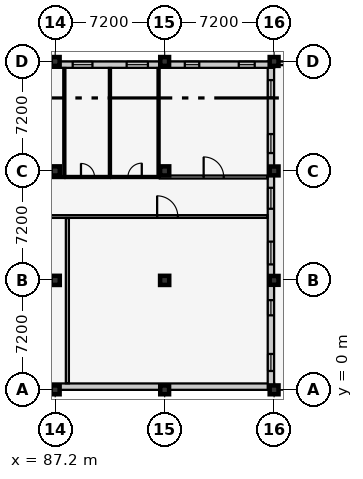
"""IFC4 building model, lengths in metres.
Left out: names, types, materials, properties, quantities, classifications, styles, units other than length and angle.
Written with IfcOpenShell. Run it as: python <this file> out.ifc"""

import sys

from ifc_helpers import new_model, si_unit, direction, frame, frame_2d, origin, origin_2d, place, context, subcontext, project, spatial, rectangle, extrude, element, fill, save


model = new_model("IFC4")
c1 = context("Model", 3, precision=1e-05, world=origin(), true_north=direction((0.0, 1.0)))
c2 = subcontext(c1, "Body", "Model", "MODEL_VIEW")
j1 = project(units=[si_unit("LENGTHUNIT", "METRE"), si_unit("PLANEANGLEUNIT", "RADIAN")], contexts=[c1])
p1 = place(None, origin())
s1 = spatial("IfcSite", under=j1, at=p1, CompositionType="ELEMENT")
p2 = place(p1, origin())
s2 = spatial("IfcBuilding", under=s1, at=p2, CompositionType="ELEMENT")
p3 = place(p2, frame((0.0, 0.0, 9.6)))
s3 = spatial("IfcBuildingStorey", under=s2, at=p3, CompositionType="ELEMENT", Elevation=9.6)
p4 = place(p3, frame((87.2, 0.0, 0.0), z_axis=(0.0, 0.0, 1.0), x_axis=(1.0, 0.0, 0.0)))
e1 = element("IfcColumn", 1, at=p4, inside=s3, PredefinedType="COLUMN", context=c2, shape_type="SweptSolid", body=[
    extrude(rectangle(XDim=0.58, YDim=0.58, at=origin_2d()), origin(), (0.0, 0.0, 1.0), 4.2),
])
for number, where, z_axis, x_axis in (
    (2, (87.2, 7.2, 0.0), (0.0, 0.0, 1.0), (1.0, 0.0, 0.0)),
    (3, (87.2, 14.4, 0.0), (0.0, 0.0, 1.0), (1.0, 0.0, 0.0)),
):
    element("IfcColumn", number, at=place(p3, frame(where, z_axis=z_axis, x_axis=x_axis)), inside=s3, PredefinedType="COLUMN", context=c2, shape_type="SweptSolid", body=[
        extrude(rectangle(XDim=0.6, YDim=0.6, at=origin_2d()), origin(), (0.0, 0.0, 1.0), 4.2),
    ])
for number, where, z_axis, x_axis in (
    (4, (87.2, 21.6, 0.0), (0.0, 0.0, 1.0), (1.0, 0.0, 0.0)),
    (5, (94.4, 0.0, 0.0), (0.0, 0.0, 1.0), (1.0, 0.0, 0.0)),
):
    element("IfcColumn", number, at=place(p3, frame(where, z_axis=z_axis, x_axis=x_axis)), inside=s3, PredefinedType="COLUMN", context=c2, shape_type="SweptSolid", body=[
        extrude(rectangle(XDim=0.58, YDim=0.58, at=origin_2d()), origin(), (0.0, 0.0, 1.0), 4.2),
    ])
for number, where, z_axis, x_axis in (
    (6, (94.4, 7.2, 0.0), (0.0, 0.0, 1.0), (1.0, 0.0, 0.0)),
    (7, (94.4, 14.4, 0.0), (0.0, 0.0, 1.0), (1.0, 0.0, 0.0)),
):
    element("IfcColumn", number, at=place(p3, frame(where, z_axis=z_axis, x_axis=x_axis)), inside=s3, PredefinedType="COLUMN", context=c2, shape_type="SweptSolid", body=[
        extrude(rectangle(XDim=0.6, YDim=0.6, at=origin_2d()), origin(), (0.0, 0.0, 1.0), 4.2),
    ])
for number, where, z_axis, x_axis in (
    (8, (94.4, 21.6, 0.0), (0.0, 0.0, 1.0), (1.0, 0.0, 0.0)),
    (9, (101.6, 0.0, 0.0), (0.0, 0.0, 1.0), (1.0, 0.0, 0.0)),
    (10, (101.6, 7.2, 0.0), (0.0, 0.0, 1.0), (1.0, 0.0, 0.0)),
    (11, (101.6, 14.4, 0.0), (0.0, 0.0, 1.0), (1.0, 0.0, 0.0)),
    (12, (101.6, 21.6, 0.0), (0.0, 0.0, 1.0), (1.0, 0.0, 0.0)),
):
    element("IfcColumn", number, at=place(p3, frame(where, z_axis=z_axis, x_axis=x_axis)), inside=s3, PredefinedType="COLUMN", context=c2, shape_type="SweptSolid", body=[
        extrude(rectangle(XDim=0.58, YDim=0.58, at=origin_2d()), origin(), (0.0, 0.0, 1.0), 4.2),
    ])
p5 = place(p3, frame((101.6, 0.21, 0.0), z_axis=(0.0, 0.0, 1.0), x_axis=(-1.0, 0.0, 0.0)))
e13 = element("IfcWall", 13, at=p5, inside=s3, PredefinedType="SOLIDWALL", context=c2, shape_type="SweptSolid", body=[
    extrude(rectangle(XDim=43.2, YDim=0.42, at=frame_2d((21.6, 0.0))), origin(), (0.0, 0.0, 1.0), 3.255),
])
p6 = place(p3, frame((101.39, 21.6, 0.0), z_axis=(0.0, 0.0, 1.0), x_axis=(0.0, -1.0, 0.0)))
e14 = element("IfcWall", 14, at=p6, inside=s3, PredefinedType="SOLIDWALL", context=c2, shape_type="SweptSolid", body=[
    extrude(rectangle(XDim=21.6, YDim=0.42, at=frame_2d((10.8, 0.0))), origin(), (0.0, 0.0, 1.0), 3.355),
])
p7 = place(p6, frame((1.225, 0.0, 0.9)))
e15 = element("IfcOpeningElement", 15, at=p7, cuts=e14, PredefinedType="OPENING", context=c2, shape_type="SweptSolid", body=[
    extrude(rectangle(XDim=1.15, YDim=1.6, at=frame_2d((0.575, 0.8))), frame((0.0, 0.222, 0.0), z_axis=(0.0, -1.0, 0.0), x_axis=(1.0, 0.0, 0.0)), (0.0, 0.0, 1.0), 0.444),
])
p8 = place(p6, frame((4.775, 0.0, 0.9)))
e16 = element("IfcOpeningElement", 16, at=p8, cuts=e14, PredefinedType="OPENING", context=c2, shape_type="SweptSolid", body=[
    extrude(rectangle(XDim=1.25, YDim=1.6, at=frame_2d((0.625, 0.8))), frame((0.0, 0.222, 0.0), z_axis=(0.0, -1.0, 0.0), x_axis=(1.0, 0.0, 0.0)), (0.0, 0.0, 1.0), 0.444),
])
p9 = place(p6, frame((8.31, 0.0, 0.9)))
e17 = element("IfcOpeningElement", 17, at=p9, cuts=e14, PredefinedType="OPENING", context=c2, shape_type="SweptSolid", body=[
    extrude(rectangle(XDim=1.38, YDim=1.6, at=frame_2d((0.69, 0.8))), frame((0.0, 0.222, 0.0), z_axis=(0.0, -1.0, 0.0), x_axis=(1.0, 0.0, 0.0)), (0.0, 0.0, 1.0), 0.444),
])
p10 = place(p6, frame((11.85, 0.0, 0.9)))
e18 = element("IfcOpeningElement", 18, at=p10, cuts=e14, PredefinedType="OPENING", context=c2, shape_type="SweptSolid", body=[
    extrude(rectangle(XDim=1.5, YDim=1.6, at=frame_2d((0.75, 0.8))), frame((0.0, 0.222, 0.0), z_axis=(0.0, -1.0, 0.0), x_axis=(1.0, 0.0, 0.0)), (0.0, 0.0, 1.0), 0.444),
])
p11 = place(p6, frame((15.7, 0.0, 0.9)))
e19 = element("IfcOpeningElement", 19, at=p11, cuts=e14, PredefinedType="OPENING", context=c2, shape_type="SweptSolid", body=[
    extrude(rectangle(XDim=1.0, YDim=1.75, at=frame_2d((0.5, 0.875))), frame((0.0, 0.222, 0.0), z_axis=(0.0, -1.0, 0.0), x_axis=(1.0, 0.0, 0.0)), (0.0, 0.0, 1.0), 0.444),
])
p12 = place(p6, frame((19.24, 0.0, 0.9)))
e20 = element("IfcOpeningElement", 20, at=p12, cuts=e14, PredefinedType="OPENING", context=c2, shape_type="SweptSolid", body=[
    extrude(rectangle(XDim=1.12, YDim=1.75, at=frame_2d((0.56, 0.875))), frame((0.0, 0.222, 0.0), z_axis=(0.0, -1.0, 0.0), x_axis=(1.0, 0.0, 0.0)), (0.0, 0.0, 1.0), 0.444),
])
p13 = place(p3, frame((58.4, 21.39, 0.0), z_axis=(0.0, 0.0, 1.0), x_axis=(1.0, 0.0, 0.0)))
e21 = element("IfcWall", 21, at=p13, inside=s3, PredefinedType="SOLIDWALL", context=c2, shape_type="SweptSolid", body=[
    extrude(rectangle(XDim=43.2, YDim=0.42, at=frame_2d((21.6, 0.0))), origin(), (0.0, 0.0, 1.0), 3.255),
])
p14 = place(p13, frame((1.18, 0.0, 0.9)))
e22 = element("IfcOpeningElement", 22, at=p14, cuts=e21, PredefinedType="OPENING", context=c2, shape_type="SweptSolid", body=[
    extrude(rectangle(XDim=1.24, YDim=1.75, at=frame_2d((0.62, 0.875))), frame((0.0, 0.222, 0.0), z_axis=(0.0, -1.0, 0.0), x_axis=(1.0, 0.0, 0.0)), (0.0, 0.0, 1.0), 0.444),
])
p15 = place(p13, frame((4.73, 0.0, 0.9)))
e23 = element("IfcOpeningElement", 23, at=p15, cuts=e21, PredefinedType="OPENING", context=c2, shape_type="SweptSolid", body=[
    extrude(rectangle(XDim=1.34, YDim=1.75, at=frame_2d((0.67, 0.875))), frame((0.0, 0.222, 0.0), z_axis=(0.0, -1.0, 0.0), x_axis=(1.0, 0.0, 0.0)), (0.0, 0.0, 1.0), 0.444),
])
p16 = place(p13, frame((8.28, 0.0, 0.9)))
e24 = element("IfcOpeningElement", 24, at=p16, cuts=e21, PredefinedType="OPENING", context=c2, shape_type="SweptSolid", body=[
    extrude(rectangle(XDim=1.44, YDim=1.75, at=frame_2d((0.72, 0.875))), frame((0.0, 0.222, 0.0), z_axis=(0.0, -1.0, 0.0), x_axis=(1.0, 0.0, 0.0)), (0.0, 0.0, 1.0), 0.444),
])
p17 = place(p13, frame((15.75, 0.0, 0.9)))
e25 = element("IfcOpeningElement", 25, at=p17, cuts=e21, PredefinedType="OPENING", context=c2, shape_type="SweptSolid", body=[
    extrude(rectangle(XDim=0.9, YDim=1.35, at=frame_2d((0.45, 0.675))), frame((0.0, 0.222, 0.0), z_axis=(0.0, -1.0, 0.0), x_axis=(1.0, 0.0, 0.0)), (0.0, 0.0, 1.0), 0.444),
])
p18 = place(p13, frame((19.3, 0.0, 0.9)))
e26 = element("IfcOpeningElement", 26, at=p18, cuts=e21, PredefinedType="OPENING", context=c2, shape_type="SweptSolid", body=[
    extrude(rectangle(XDim=1.0, YDim=1.35, at=frame_2d((0.5, 0.675))), frame((0.0, 0.222, 0.0), z_axis=(0.0, -1.0, 0.0), x_axis=(1.0, 0.0, 0.0)), (0.0, 0.0, 1.0), 0.444),
])
p19 = place(p13, frame((22.85, 0.0, 0.9)))
e27 = element("IfcOpeningElement", 27, at=p19, cuts=e21, PredefinedType="OPENING", context=c2, shape_type="SweptSolid", body=[
    extrude(rectangle(XDim=1.1, YDim=1.35, at=frame_2d((0.55, 0.675))), frame((0.0, 0.222, 0.0), z_axis=(0.0, -1.0, 0.0), x_axis=(1.0, 0.0, 0.0)), (0.0, 0.0, 1.0), 0.444),
])
p20 = place(p13, frame((29.95, 0.0, 0.9)))
e28 = element("IfcOpeningElement", 28, at=p20, cuts=e21, PredefinedType="OPENING", context=c2, shape_type="SweptSolid", body=[
    extrude(rectangle(XDim=1.3, YDim=1.35, at=frame_2d((0.65, 0.675))), frame((0.0, 0.222, 0.0), z_axis=(0.0, -1.0, 0.0), x_axis=(1.0, 0.0, 0.0)), (0.0, 0.0, 1.0), 0.444),
])
p21 = place(p13, frame((33.5, 0.0, 0.9)))
e29 = element("IfcOpeningElement", 29, at=p21, cuts=e21, PredefinedType="OPENING", context=c2, shape_type="SweptSolid", body=[
    extrude(rectangle(XDim=1.4, YDim=1.35, at=frame_2d((0.7, 0.675))), frame((0.0, 0.222, 0.0), z_axis=(0.0, -1.0, 0.0), x_axis=(1.0, 0.0, 0.0)), (0.0, 0.0, 1.0), 0.444),
])
p22 = place(p13, frame((37.325, 0.0, 0.9)))
e30 = element("IfcOpeningElement", 30, at=p22, cuts=e21, PredefinedType="OPENING", context=c2, shape_type="SweptSolid", body=[
    extrude(rectangle(XDim=0.95, YDim=1.45, at=frame_2d((0.475, 0.725))), frame((0.0, 0.222, 0.0), z_axis=(0.0, -1.0, 0.0), x_axis=(1.0, 0.0, 0.0)), (0.0, 0.0, 1.0), 0.444),
])
p23 = place(p13, frame((40.875, 0.0, 0.9)))
e31 = element("IfcOpeningElement", 31, at=p23, cuts=e21, PredefinedType="OPENING", context=c2, shape_type="SweptSolid", body=[
    extrude(rectangle(XDim=1.05, YDim=1.45, at=frame_2d((0.525, 0.725))), frame((0.0, 0.222, 0.0), z_axis=(0.0, -1.0, 0.0), x_axis=(1.0, 0.0, 0.0)), (0.0, 0.0, 1.0), 0.444),
])
p24 = place(p3, frame((101.75, 21.48, 0.0), z_axis=(0.0, 0.0, 1.0), x_axis=(1.0, 0.0, 0.0)))
e32 = element("IfcWall", 32, at=p24, inside=s3, PredefinedType="PARAPET", context=c2, shape_type="SweptSolid", body=[
    extrude(rectangle(XDim=6.9, YDim=0.24, at=frame_2d((3.45, 0.0))), origin(), (0.0, 0.0, 1.0), 0.65),
])
p25 = place(p3, frame((58.83, 11.4, 0.0), z_axis=(0.0, 0.0, 1.0), x_axis=(1.0, 0.0, 0.0)))
e33 = element("IfcWall", 33, at=p25, inside=s3, PredefinedType="PARTITIONING", context=c2, shape_type="SweptSolid", body=[
    extrude(rectangle(XDim=42.34, YDim=0.18, at=frame_2d((21.17, 0.0))), origin(), (0.0, 0.0, 1.0), 3.96),
])
p26 = place(p25, frame((6.905, 0.0, 0.0)))
e34 = element("IfcOpeningElement", 34, at=p26, cuts=e33, PredefinedType="OPENING", context=c2, shape_type="SweptSolid", body=[
    extrude(rectangle(XDim=1.36, YDim=2.2, at=frame_2d((0.68, 1.1))), frame((0.0, 0.102, 0.0), z_axis=(0.0, -1.0, 0.0), x_axis=(1.0, 0.0, 0.0)), (0.0, 0.0, 1.0), 0.204),
])
p27 = place(p25, frame((21.49, 0.0, 0.0)))
e35 = element("IfcOpeningElement", 35, at=p27, cuts=e33, PredefinedType="OPENING", context=c2, shape_type="SweptSolid", body=[
    extrude(rectangle(XDim=1.36, YDim=2.2, at=frame_2d((0.68, 1.1))), frame((0.0, 0.102, 0.0), z_axis=(0.0, -1.0, 0.0), x_axis=(1.0, 0.0, 0.0)), (0.0, 0.0, 1.0), 0.204),
])
p28 = place(p25, frame((35.075, 0.0, 0.0)))
e36 = element("IfcOpeningElement", 36, at=p28, cuts=e33, PredefinedType="OPENING", context=c2, shape_type="SweptSolid", body=[
    extrude(rectangle(XDim=1.36, YDim=2.2, at=frame_2d((0.68, 1.1))), frame((0.0, 0.102, 0.0), z_axis=(0.0, -1.0, 0.0), x_axis=(1.0, 0.0, 0.0)), (0.0, 0.0, 1.0), 0.204),
])
p29 = place(p3, frame((88.0, 0.43, 0.0), z_axis=(0.0, 0.0, 1.0), x_axis=(0.0, 1.0, 0.0)))
e37 = element("IfcWall", 37, at=p29, inside=s3, PredefinedType="PARTITIONING", context=c2, shape_type="SweptSolid", body=[
    extrude(rectangle(XDim=10.87, YDim=0.2, at=frame_2d((5.435, 0.0))), origin(), (0.0, 0.0, 1.0), 3.96),
])
p30 = place(p3, frame((84.8, 14.0, 0.0), z_axis=(0.0, 0.0, 1.0), x_axis=(1.0, 0.0, 0.0)))
e38 = element("IfcWall", 38, at=p30, inside=s3, PredefinedType="PARTITIONING", context=c2, shape_type="SweptSolid", body=[
    extrude(rectangle(XDim=3.0, YDim=0.14, at=frame_2d((1.5, 0.0))), origin(), (0.0, 0.0, 1.0), 3.96),
])
p31 = place(p30, frame((0.25, 0.0, 0.0)))
e39 = element("IfcOpeningElement", 39, at=p31, cuts=e38, PredefinedType="OPENING", context=c2, shape_type="SweptSolid", body=[
    extrude(rectangle(XDim=1.06, YDim=2.1, at=frame_2d((0.53, 1.05))), frame((0.0, 0.082, 0.0), z_axis=(0.0, -1.0, 0.0), x_axis=(1.0, 0.0, 0.0)), (0.0, 0.0, 1.0), 0.164),
])
p32 = place(p3, frame((87.8, 14.08, 0.0), z_axis=(0.0, 0.0, 1.0), x_axis=(0.0, 1.0, 0.0)))
e40 = element("IfcWall", 40, at=p32, inside=s3, PredefinedType="PARTITIONING", context=c2, shape_type="SweptSolid", body=[
    extrude(rectangle(XDim=7.09, YDim=0.14, at=frame_2d((3.545, 0.0))), origin(), (0.0, 0.0, 1.0), 3.96),
])
p33 = place(p3, frame((87.88, 14.0, 0.0), z_axis=(0.0, 0.0, 1.0), x_axis=(1.0, 0.0, 0.0)))
e41 = element("IfcWall", 41, at=p33, inside=s3, PredefinedType="PARTITIONING", context=c2, shape_type="SweptSolid", body=[
    extrude(rectangle(XDim=2.92, YDim=0.14, at=frame_2d((1.46, 0.0))), origin(), (0.0, 0.0, 1.0), 3.96),
])
p34 = place(p33, frame((1.015, 0.0, 0.0)))
e42 = element("IfcOpeningElement", 42, at=p34, cuts=e41, PredefinedType="OPENING", context=c2, shape_type="SweptSolid", body=[
    extrude(rectangle(XDim=0.89, YDim=2.05, at=frame_2d((0.445, 1.025))), frame((0.0, 0.082, 0.0), z_axis=(0.0, -1.0, 0.0), x_axis=(1.0, 0.0, 0.0)), (0.0, 0.0, 1.0), 0.164),
])
p35 = place(p3, frame((90.8, 14.08, 0.0), z_axis=(0.0, 0.0, 1.0), x_axis=(0.0, 1.0, 0.0)))
e43 = element("IfcWall", 43, at=p35, inside=s3, PredefinedType="PARTITIONING", context=c2, shape_type="SweptSolid", body=[
    extrude(rectangle(XDim=7.09, YDim=0.14, at=frame_2d((3.545, 0.0))), origin(), (0.0, 0.0, 1.0), 3.745),
])
p36 = place(p3, frame((90.88, 14.0, 0.0), z_axis=(0.0, 0.0, 1.0), x_axis=(1.0, 0.0, 0.0)))
e44 = element("IfcWall", 44, at=p36, inside=s3, PredefinedType="PARTITIONING", context=c2, shape_type="SweptSolid", body=[
    extrude(rectangle(XDim=3.12, YDim=0.14, at=frame_2d((1.56, 0.0))), origin(), (0.0, 0.0, 1.0), 3.96),
])
p37 = place(p36, frame((1.105, 0.0, 0.0)))
e45 = element("IfcOpeningElement", 45, at=p37, cuts=e44, PredefinedType="OPENING", context=c2, shape_type="SweptSolid", body=[
    extrude(rectangle(XDim=0.91, YDim=2.06, at=frame_2d((0.455, 1.03))), frame((0.0, 0.082, 0.0), z_axis=(0.0, -1.0, 0.0), x_axis=(1.0, 0.0, 0.0)), (0.0, 0.0, 1.0), 0.164),
])
p38 = place(p3, frame((94.0, 14.08, 0.0), z_axis=(0.0, 0.0, 1.0), x_axis=(0.0, 1.0, 0.0)))
e46 = element("IfcWall", 46, at=p38, inside=s3, PredefinedType="PARTITIONING", context=c2, shape_type="SweptSolid", body=[
    extrude(rectangle(XDim=7.09, YDim=0.14, at=frame_2d((3.545, 0.0))), origin(), (0.0, 0.0, 1.0), 3.96),
])
p39 = place(p3, frame((94.08, 14.0, 0.0), z_axis=(0.0, 0.0, 1.0), x_axis=(1.0, 0.0, 0.0)))
e47 = element("IfcWall", 47, at=p39, inside=s3, PredefinedType="PARTITIONING", context=c2, shape_type="SweptSolid", body=[
    extrude(rectangle(XDim=7.09, YDim=0.2, at=frame_2d((3.545, 0.0))), origin(), (0.0, 0.0, 1.0), 3.96),
])
p40 = place(p39, frame((2.885, 0.0, 0.0)))
e48 = element("IfcOpeningElement", 48, at=p40, cuts=e47, PredefinedType="OPENING", context=c2, shape_type="SweptSolid", body=[
    extrude(rectangle(XDim=1.32, YDim=2.15, at=frame_2d((0.66, 1.075))), frame((0.0, 0.112, 0.0), z_axis=(0.0, -1.0, 0.0), x_axis=(1.0, 0.0, 0.0)), (0.0, 0.0, 1.0), 0.224),
])
p41 = place(p7, origin())
e49 = element("IfcWindow", 49, at=p41, inside=s3, PartitioningType="SINGLE_PANEL", PredefinedType="WINDOW", context=c2, shape_type="SweptSolid", body=[
    extrude(rectangle(XDim=1.15, YDim=1.6, at=frame_2d((0.575, 0.8))), frame((0.0, 0.03, 0.0), z_axis=(0.0, -1.0, 0.0), x_axis=(1.0, 0.0, 0.0)), (0.0, 0.0, 1.0), 0.06),
])
fill(e15, e49)
p42 = place(p8, origin())
e50 = element("IfcWindow", 50, at=p42, inside=s3, PartitioningType="SINGLE_PANEL", PredefinedType="WINDOW", context=c2, shape_type="SweptSolid", body=[
    extrude(rectangle(XDim=1.25, YDim=1.6, at=frame_2d((0.625, 0.8))), frame((0.0, 0.03, 0.0), z_axis=(0.0, -1.0, 0.0), x_axis=(1.0, 0.0, 0.0)), (0.0, 0.0, 1.0), 0.06),
])
fill(e16, e50)
p43 = place(p9, origin())
e51 = element("IfcWindow", 51, at=p43, inside=s3, PartitioningType="SINGLE_PANEL", PredefinedType="WINDOW", context=c2, shape_type="SweptSolid", body=[
    extrude(rectangle(XDim=1.38, YDim=1.6, at=frame_2d((0.69, 0.8))), frame((0.0, 0.03, 0.0), z_axis=(0.0, -1.0, 0.0), x_axis=(1.0, 0.0, 0.0)), (0.0, 0.0, 1.0), 0.06),
])
fill(e17, e51)
p44 = place(p10, origin())
e52 = element("IfcWindow", 52, at=p44, inside=s3, PartitioningType="SINGLE_PANEL", PredefinedType="WINDOW", context=c2, shape_type="SweptSolid", body=[
    extrude(rectangle(XDim=1.5, YDim=1.6, at=frame_2d((0.75, 0.8))), frame((0.0, 0.03, 0.0), z_axis=(0.0, -1.0, 0.0), x_axis=(1.0, 0.0, 0.0)), (0.0, 0.0, 1.0), 0.06),
])
fill(e18, e52)
p45 = place(p11, origin())
e53 = element("IfcWindow", 53, at=p45, inside=s3, PartitioningType="SINGLE_PANEL", PredefinedType="WINDOW", context=c2, shape_type="SweptSolid", body=[
    extrude(rectangle(XDim=1.0, YDim=1.75, at=frame_2d((0.5, 0.875))), frame((0.0, 0.03, 0.0), z_axis=(0.0, -1.0, 0.0), x_axis=(1.0, 0.0, 0.0)), (0.0, 0.0, 1.0), 0.06),
])
fill(e19, e53)
p46 = place(p12, origin())
e54 = element("IfcWindow", 54, at=p46, inside=s3, PartitioningType="SINGLE_PANEL", PredefinedType="WINDOW", context=c2, shape_type="SweptSolid", body=[
    extrude(rectangle(XDim=1.12, YDim=1.75, at=frame_2d((0.56, 0.875))), frame((0.0, 0.03, 0.0), z_axis=(0.0, -1.0, 0.0), x_axis=(1.0, 0.0, 0.0)), (0.0, 0.0, 1.0), 0.06),
])
fill(e20, e54)
p47 = place(p20, origin())
e55 = element("IfcWindow", 55, at=p47, inside=s3, PartitioningType="SINGLE_PANEL", PredefinedType="WINDOW", context=c2, shape_type="SweptSolid", body=[
    extrude(rectangle(XDim=1.3, YDim=1.35, at=frame_2d((0.65, 0.675))), frame((0.0, 0.03, 0.0), z_axis=(0.0, -1.0, 0.0), x_axis=(1.0, 0.0, 0.0)), (0.0, 0.0, 1.0), 0.06),
])
fill(e28, e55)
p48 = place(p21, origin())
e56 = element("IfcWindow", 56, at=p48, inside=s3, PartitioningType="SINGLE_PANEL", PredefinedType="WINDOW", context=c2, shape_type="SweptSolid", body=[
    extrude(rectangle(XDim=1.4, YDim=1.35, at=frame_2d((0.7, 0.675))), frame((0.0, 0.03, 0.0), z_axis=(0.0, -1.0, 0.0), x_axis=(1.0, 0.0, 0.0)), (0.0, 0.0, 1.0), 0.06),
])
fill(e29, e56)
p49 = place(p22, origin())
e57 = element("IfcWindow", 57, at=p49, inside=s3, PartitioningType="SINGLE_PANEL", PredefinedType="WINDOW", context=c2, shape_type="SweptSolid", body=[
    extrude(rectangle(XDim=0.95, YDim=1.45, at=frame_2d((0.475, 0.725))), frame((0.0, 0.03, 0.0), z_axis=(0.0, -1.0, 0.0), x_axis=(1.0, 0.0, 0.0)), (0.0, 0.0, 1.0), 0.06),
])
fill(e30, e57)
p50 = place(p23, origin())
e58 = element("IfcWindow", 58, at=p50, inside=s3, PartitioningType="SINGLE_PANEL", PredefinedType="WINDOW", context=c2, shape_type="SweptSolid", body=[
    extrude(rectangle(XDim=1.05, YDim=1.45, at=frame_2d((0.525, 0.725))), frame((0.0, 0.03, 0.0), z_axis=(0.0, -1.0, 0.0), x_axis=(1.0, 0.0, 0.0)), (0.0, 0.0, 1.0), 0.06),
])
fill(e31, e58)
p51 = place(p28, origin())
e59 = element("IfcDoor", 59, at=p51, inside=s3, OperationType="SINGLE_SWING_LEFT", PredefinedType="DOOR", context=c2, shape_type="SweptSolid", body=[
    extrude(rectangle(XDim=1.36, YDim=2.2, at=frame_2d((0.68, 1.1))), frame((0.0, 0.025, 0.0), z_axis=(0.0, -1.0, 0.0), x_axis=(1.0, 0.0, 0.0)), (0.0, 0.0, 1.0), 0.05),
])
fill(e36, e59)
p52 = place(p34, origin())
e60 = element("IfcDoor", 60, at=p52, inside=s3, OperationType="SINGLE_SWING_LEFT", PredefinedType="DOOR", context=c2, shape_type="SweptSolid", body=[
    extrude(rectangle(XDim=0.89, YDim=2.05, at=frame_2d((0.445, 1.025))), frame((0.0, 0.025, 0.0), z_axis=(0.0, -1.0, 0.0), x_axis=(1.0, 0.0, 0.0)), (0.0, 0.0, 1.0), 0.05),
])
fill(e42, e60)
p53 = place(p37, origin())
e61 = element("IfcDoor", 61, at=p53, inside=s3, OperationType="SINGLE_SWING_RIGHT", PredefinedType="DOOR", context=c2, shape_type="SweptSolid", body=[
    extrude(rectangle(XDim=0.91, YDim=2.06, at=frame_2d((0.455, 1.03))), frame((0.0, 0.025, 0.0), z_axis=(0.0, -1.0, 0.0), x_axis=(1.0, 0.0, 0.0)), (0.0, 0.0, 1.0), 0.05),
])
fill(e45, e61)
p54 = place(p40, origin())
e62 = element("IfcDoor", 62, at=p54, inside=s3, OperationType="SINGLE_SWING_LEFT", PredefinedType="DOOR", context=c2, shape_type="SweptSolid", body=[
    extrude(rectangle(XDim=1.32, YDim=2.15, at=frame_2d((0.66, 1.075))), frame((0.0, 0.025, 0.0), z_axis=(0.0, -1.0, 0.0), x_axis=(1.0, 0.0, 0.0)), (0.0, 0.0, 1.0), 0.05),
])
fill(e48, e62)
save(model, sys.argv[1])
